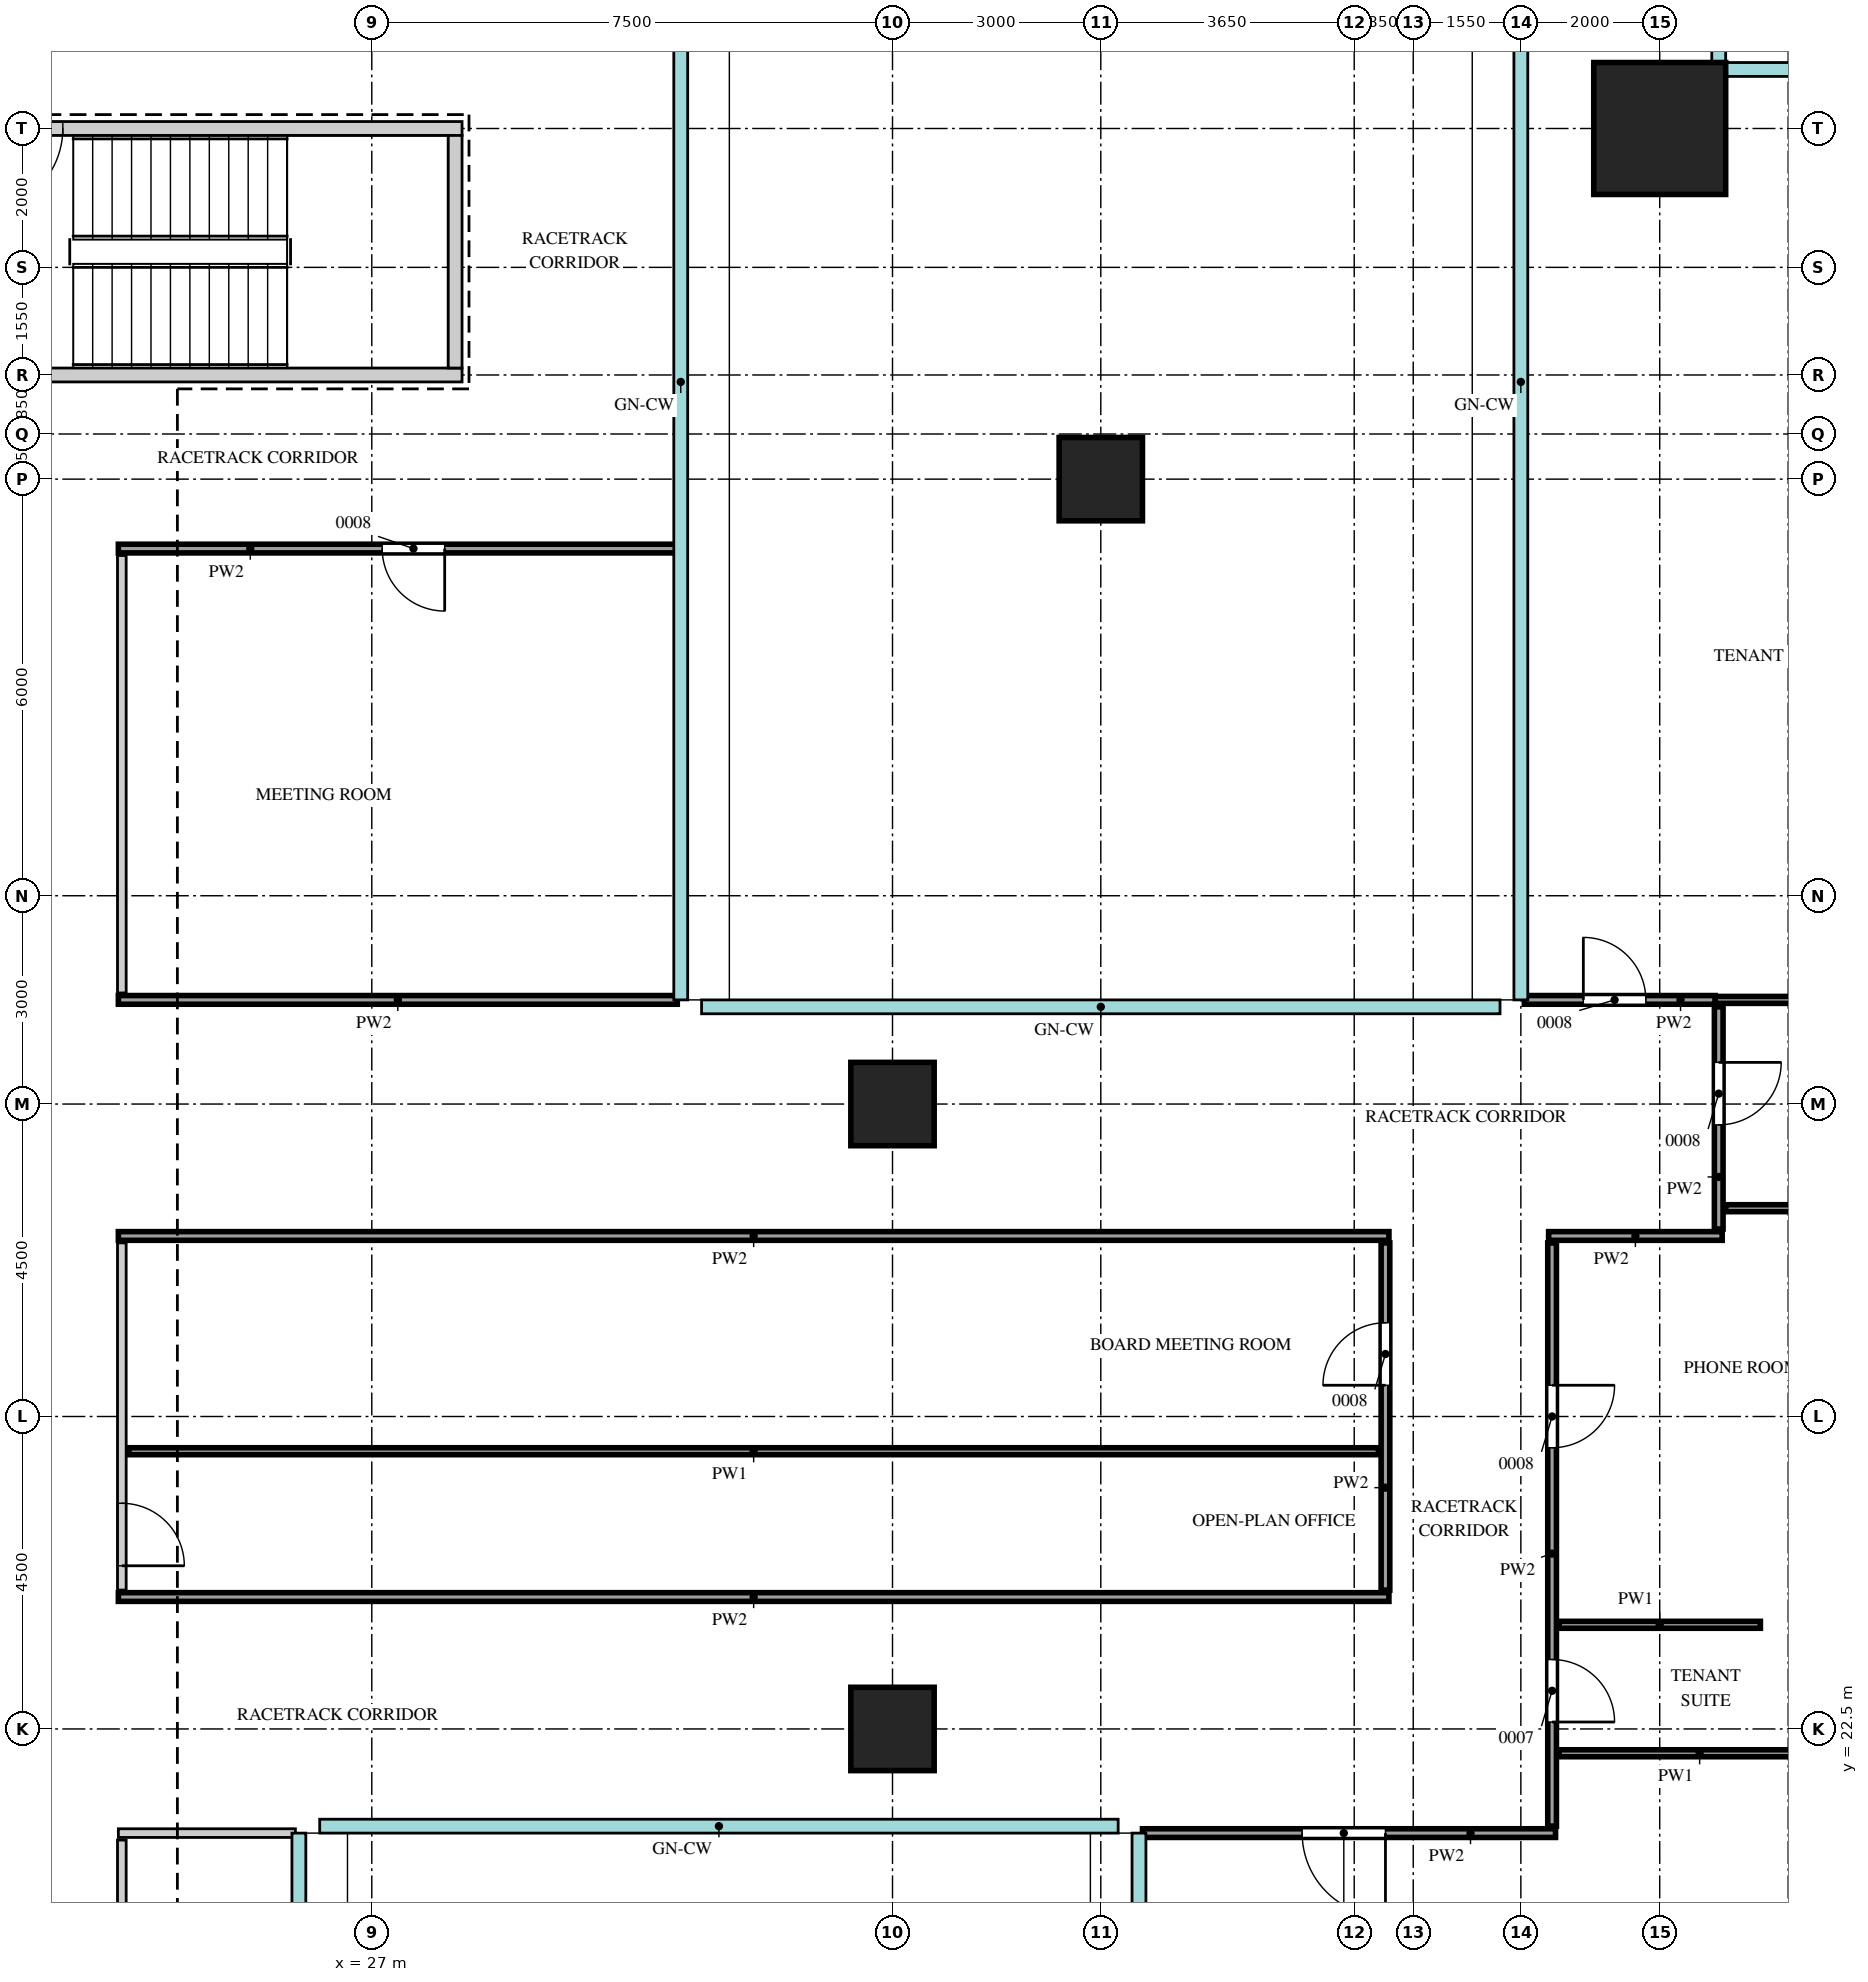
"""IFC4 building model, lengths in metres.
Left out: names, types, materials, properties, quantities, classifications, styles, units other than length and angle.
Written with IfcOpenShell. Run it as: python <this file> out.ifc"""

import sys

from ifc_helpers import new_model, si_unit, direction, frame, frame_2d, origin, origin_2d, place, context, subcontext, project, spatial, rectangle, extrude, source, transform, mapped, element, fill, save


model = new_model("IFC4")
c1 = context("Model", 3, precision=1e-05, world=origin(), true_north=direction((0.0, 1.0)))
c2 = subcontext(c1, "Body", "Model", "MODEL_VIEW")
j1 = project(units=[si_unit("LENGTHUNIT", "METRE"), si_unit("PLANEANGLEUNIT", "RADIAN")], contexts=[c1])
p1 = place(None, origin())
s1 = spatial("IfcSite", under=j1, at=p1, CompositionType="ELEMENT")
p2 = place(p1, origin())
s2 = spatial("IfcBuilding", under=s1, at=p2, CompositionType="ELEMENT")
p3 = place(p2, frame((0.0, 0.0, 168.7)))
s3 = spatial("IfcBuildingStorey", under=s2, at=p3, CompositionType="ELEMENT", Elevation=168.7)
m1 = source(origin(), c2, "Body", "SweptSolid", [
    extrude(rectangle(XDim=7.1, YDim=0.2, at=frame_2d((3.55, 0.0))), origin(), (0.0, 0.0, 1.0), 3.75),
])
p4 = place(p3, frame((21.2, 45.55, 0.0), z_axis=(0.0, 0.0, 1.0), x_axis=(1.0, 0.0, 0.0)))
e1 = element("IfcWall", 1, at=p4, inside=s3, PredefinedType="SHEAR", context=c2, shape_type="MappedRepresentation", body=[
    mapped(m1, transform((0.0, 0.0, 0.0))),
])
m2 = source(origin(), c2, "Body", "SweptSolid", [
    extrude(rectangle(XDim=1.2, YDim=2.1, at=frame_2d((0.6, 1.05))), frame((0.0, 0.11, 0.0), z_axis=(0.0, -1.0, 0.0), x_axis=(1.0, 0.0, 0.0)), (0.0, 0.0, 1.0), 0.22),
])
p5 = place(p4, frame((0.15, 0.0, 0.0)))
e2 = element("IfcOpeningElement", 2, at=p5, cuts=e1, PredefinedType="OPENING", context=c2, shape_type="MappedRepresentation", body=[
    mapped(m2, transform((0.0, 0.0, 0.0))),
])
p6 = place(p3, frame((21.2, 42.0, 0.0), z_axis=(0.0, 0.0, 1.0), x_axis=(1.0, 0.0, 0.0)))
e3 = element("IfcWall", 3, at=p6, inside=s3, PredefinedType="SHEAR", context=c2, shape_type="MappedRepresentation", body=[
    mapped(m1, transform((0.0, 0.0, 0.0))),
])
m3 = source(origin(), c2, "Body", "SweptSolid", [
    extrude(rectangle(XDim=3.35, YDim=0.2, at=frame_2d((1.675, 0.0))), origin(), (0.0, 0.0, 1.0), 3.75),
])
p7 = place(p3, frame((28.2, 42.1, 0.0), z_axis=(0.0, 0.0, 1.0), x_axis=(0.0, 1.0, 0.0)))
e4 = element("IfcWall", 4, at=p7, inside=s3, PredefinedType="SHEAR", context=c2, shape_type="MappedRepresentation", body=[
    mapped(m3, transform((0.0, 0.0, 0.0))),
])
m4 = source(origin(), c2, "Body", "SweptSolid", [
    extrude(rectangle(XDim=1.9, YDim=1.9, at=origin_2d()), origin(), (0.0, 0.0, 1.0), 4.0),
])
p8 = place(p3, frame((45.55, 45.55, 0.0), z_axis=(0.0, 0.0, 1.0), x_axis=(1.0, 0.0, 0.0)))
e5 = element("IfcColumn", 5, at=p8, inside=s3, PredefinedType="COLUMN", context=c2, shape_type="MappedRepresentation", body=[
    mapped(m4, transform((0.0, 0.0, 0.0))),
])
m5 = source(origin(), c2, "Body", "SweptSolid", [
    extrude(rectangle(XDim=1.2, YDim=1.2, at=origin_2d()), origin(), (0.0, 0.0, 1.0), 4.0),
])
p9 = place(p3, frame((37.5, 40.5, 0.0), z_axis=(0.0, 0.0, 1.0), x_axis=(1.0, 0.0, 0.0)))
e6 = element("IfcColumn", 6, at=p9, inside=s3, PredefinedType="COLUMN", context=c2, shape_type="MappedRepresentation", body=[
    mapped(m5, transform((0.0, 0.0, 0.0))),
])
m6 = source(origin(), c2, "Body", "SweptSolid", [
    extrude(rectangle(XDim=1.2, YDim=1.2, at=origin_2d()), origin(), (0.0, 0.0, 1.0), 3.75),
])
for number, where, z_axis, x_axis in (
    (7, (34.5, 22.5, 0.0), (0.0, 0.0, 1.0), (1.0, 0.0, 0.0)),
    (8, (34.5, 31.5, 0.0), (0.0, 0.0, 1.0), (1.0, 0.0, 0.0)),
):
    element("IfcColumn", number, at=place(p3, frame(where, z_axis=z_axis, x_axis=x_axis)), inside=s3, PredefinedType="COLUMN", context=c2, shape_type="MappedRepresentation", body=[
        mapped(m6, transform((0.0, 0.0, 0.0))),
    ])
m7 = source(origin(), c2, "Body", "SweptSolid", [
    extrude(rectangle(XDim=12.45, YDim=0.125, at=frame_2d((6.225, 0.0))), origin(), (0.0, 0.0, 1.0), 3.8),
])
p10 = place(p3, frame((23.4, 8.45, 0.0), z_axis=(0.0, 0.0, 1.0), x_axis=(0.0, 1.0, 0.0)))
e9 = element("IfcWall", 9, at=p10, inside=s3, PredefinedType="PARTITIONING", context=c2, shape_type="MappedRepresentation", body=[
    mapped(m7, transform((0.0, 0.0, 0.0))),
])
m8 = source(origin(), c2, "Body", "SweptSolid", [
    extrude(rectangle(XDim=0.9, YDim=2.1, at=frame_2d((0.45, 1.05))), frame((0.0, 0.073, 0.0), z_axis=(0.0, -1.0, 0.0), x_axis=(1.0, 0.0, 0.0)), (0.0, 0.0, 1.0), 0.145),
])
p11 = place(p10, frame((5.65, 0.0, 0.0)))
e10 = element("IfcOpeningElement", 10, at=p11, cuts=e9, PredefinedType="OPENING", context=c2, shape_type="MappedRepresentation", body=[
    mapped(m8, transform((0.0, 0.0, 0.0))),
])
m9 = source(origin(), c2, "Body", "SweptSolid", [
    extrude(rectangle(XDim=2.55, YDim=0.125, at=frame_2d((1.275, 0.0))), origin(), (0.0, 0.0, 1.0), 3.8),
])
p12 = place(p3, frame((23.35, 21.0, 0.0), z_axis=(0.0, 0.0, 1.0), x_axis=(1.0, 0.0, 0.0)))
e11 = element("IfcWall", 11, at=p12, inside=s3, PredefinedType="PARTITIONING", context=c2, shape_type="MappedRepresentation", body=[
    mapped(m9, transform((0.0, 0.0, 0.0))),
])
m10 = source(origin(), c2, "Body", "SweptSolid", [
    extrude(rectangle(XDim=5.95, YDim=0.125, at=frame_2d((2.975, 0.0))), origin(), (0.0, 0.0, 1.0), 3.8),
])
p13 = place(p3, frame((38.1, 21.0, 0.0), z_axis=(0.0, 0.0, 1.0), x_axis=(1.0, 0.0, 0.0)))
e12 = element("IfcWall", 12, at=p13, inside=s3, PredefinedType="PARTITIONING", context=c2, shape_type="MappedRepresentation", body=[
    mapped(m10, transform((0.0, 0.0, 0.0))),
])
m11 = source(origin(), c2, "Body", "SweptSolid", [
    extrude(rectangle(XDim=1.2, YDim=2.1, at=frame_2d((0.6, 1.05))), frame((0.0, 0.073, 0.0), z_axis=(0.0, -1.0, 0.0), x_axis=(1.0, 0.0, 0.0)), (0.0, 0.0, 1.0), 0.145),
])
p14 = place(p13, frame((2.3, 0.0, 0.0)))
e13 = element("IfcOpeningElement", 13, at=p14, cuts=e12, PredefinedType="OPENING", context=c2, shape_type="MappedRepresentation", body=[
    mapped(m11, transform((0.0, 0.0, 0.0))),
])
m12 = source(origin(), c2, "Body", "SweptSolid", [
    extrude(rectangle(XDim=8.4, YDim=0.125, at=frame_2d((4.2, 0.0))), origin(), (0.0, 0.0, 1.0), 3.8),
])
p15 = place(p3, frame((44.0, 21.1, 0.0), z_axis=(0.0, 0.0, 1.0), x_axis=(0.0, 1.0, 0.0)))
e14 = element("IfcWall", 14, at=p15, inside=s3, PredefinedType="PARTITIONING", context=c2, shape_type="MappedRepresentation", body=[
    mapped(m12, transform((0.0, 0.0, 0.0))),
])
p16 = place(p15, frame((1.5, 0.0, 0.0)))
e15 = element("IfcOpeningElement", 15, at=p16, cuts=e14, PredefinedType="OPENING", context=c2, shape_type="MappedRepresentation", body=[
    mapped(m8, transform((0.0, 0.0, 0.0))),
])
p17 = place(p15, frame((5.45, 0.0, 0.0)))
e16 = element("IfcOpeningElement", 16, at=p17, cuts=e14, PredefinedType="OPENING", context=c2, shape_type="MappedRepresentation", body=[
    mapped(m8, transform((0.0, 0.0, 0.0))),
])
m13 = source(origin(), c2, "Body", "SweptSolid", [
    extrude(rectangle(XDim=4.05, YDim=0.1, at=frame_2d((2.025, 0.0))), origin(), (0.0, 0.0, 1.0), 3.8),
])
p18 = place(p3, frame((44.1, 22.15, 0.0), z_axis=(0.0, 0.0, 1.0), x_axis=(1.0, 0.0, 0.0)))
e17 = element("IfcWall", 17, at=p18, inside=s3, PredefinedType="PARTITIONING", context=c2, shape_type="MappedRepresentation", body=[
    mapped(m13, transform((0.0, 0.0, 0.0))),
])
m14 = source(origin(), c2, "Body", "SweptSolid", [
    extrude(rectangle(XDim=2.9, YDim=0.1, at=frame_2d((1.45, 0.0))), origin(), (0.0, 0.0, 1.0), 3.8),
])
p19 = place(p3, frame((44.1, 24.0, 0.0), z_axis=(0.0, 0.0, 1.0), x_axis=(1.0, 0.0, 0.0)))
e18 = element("IfcWall", 18, at=p19, inside=s3, PredefinedType="PARTITIONING", context=c2, shape_type="MappedRepresentation", body=[
    mapped(m14, transform((0.0, 0.0, 0.0))),
])
m15 = source(origin(), c2, "Body", "SweptSolid", [
    extrude(rectangle(XDim=18.3, YDim=0.125, at=frame_2d((9.15, 0.0))), origin(), (0.0, 0.0, 1.0), 3.8),
])
p20 = place(p3, frame((23.35, 24.4, 0.0), z_axis=(0.0, 0.0, 1.0), x_axis=(1.0, 0.0, 0.0)))
e19 = element("IfcWall", 19, at=p20, inside=s3, PredefinedType="PARTITIONING", context=c2, shape_type="MappedRepresentation", body=[
    mapped(m15, transform((0.0, 0.0, 0.0))),
])
m16 = source(origin(), c2, "Body", "SweptSolid", [
    extrude(rectangle(XDim=5.0, YDim=0.125, at=frame_2d((2.5, 0.0))), origin(), (0.0, 0.0, 1.0), 3.8),
])
p21 = place(p3, frame((23.4, 24.5, 0.0), z_axis=(0.0, 0.0, 1.0), x_axis=(0.0, 1.0, 0.0)))
e20 = element("IfcWall", 20, at=p21, inside=s3, PredefinedType="PARTITIONING", context=c2, shape_type="MappedRepresentation", body=[
    mapped(m16, transform((0.0, 0.0, 0.0))),
])
p22 = place(p21, frame((0.35, 0.0, 0.0)))
e21 = element("IfcOpeningElement", 21, at=p22, cuts=e20, PredefinedType="OPENING", context=c2, shape_type="MappedRepresentation", body=[
    mapped(m8, transform((0.0, 0.0, 0.0))),
])
p23 = place(p3, frame((41.6, 24.5, 0.0), z_axis=(0.0, 0.0, 1.0), x_axis=(0.0, 1.0, 0.0)))
e22 = element("IfcWall", 22, at=p23, inside=s3, PredefinedType="PARTITIONING", context=c2, shape_type="MappedRepresentation", body=[
    mapped(m16, transform((0.0, 0.0, 0.0))),
])
p24 = place(p23, frame((2.95, 0.0, 0.0)))
e23 = element("IfcOpeningElement", 23, at=p24, cuts=e22, PredefinedType="OPENING", context=c2, shape_type="MappedRepresentation", body=[
    mapped(m8, transform((0.0, 0.0, 0.0))),
])
m17 = source(origin(), c2, "Body", "SweptSolid", [
    extrude(rectangle(XDim=18.0, YDim=0.1, at=frame_2d((9.0, 0.0))), origin(), (0.0, 0.0, 1.0), 3.8),
])
p25 = place(p3, frame((23.5, 26.5, 0.0), z_axis=(0.0, 0.0, 1.0), x_axis=(1.0, 0.0, 0.0)))
e24 = element("IfcWall", 24, at=p25, inside=s3, PredefinedType="PARTITIONING", context=c2, shape_type="MappedRepresentation", body=[
    mapped(m17, transform((0.0, 0.0, 0.0))),
])
p26 = place(p3, frame((23.35, 29.6, 0.0), z_axis=(0.0, 0.0, 1.0), x_axis=(1.0, 0.0, 0.0)))
e25 = element("IfcWall", 25, at=p26, inside=s3, PredefinedType="PARTITIONING", context=c2, shape_type="MappedRepresentation", body=[
    mapped(m15, transform((0.0, 0.0, 0.0))),
])
m18 = source(origin(), c2, "Body", "SweptSolid", [
    extrude(rectangle(XDim=2.5, YDim=0.125, at=frame_2d((1.25, 0.0))), origin(), (0.0, 0.0, 1.0), 3.8),
])
p27 = place(p3, frame((43.95, 29.6, 0.0), z_axis=(0.0, 0.0, 1.0), x_axis=(1.0, 0.0, 0.0)))
e26 = element("IfcWall", 26, at=p27, inside=s3, PredefinedType="PARTITIONING", context=c2, shape_type="MappedRepresentation", body=[
    mapped(m18, transform((0.0, 0.0, 0.0))),
])
m19 = source(origin(), c2, "Body", "SweptSolid", [
    extrude(rectangle(XDim=3.2, YDim=0.125, at=frame_2d((1.6, 0.0))), origin(), (0.0, 0.0, 1.0), 3.8),
])
p28 = place(p3, frame((46.4, 29.7, 0.0), z_axis=(0.0, 0.0, 1.0), x_axis=(0.0, 1.0, 0.0)))
e27 = element("IfcWall", 27, at=p28, inside=s3, PredefinedType="PARTITIONING", context=c2, shape_type="MappedRepresentation", body=[
    mapped(m19, transform((0.0, 0.0, 0.0))),
])
p29 = place(p28, frame((1.5, 0.0, 0.0)))
e28 = element("IfcOpeningElement", 28, at=p29, cuts=e27, PredefinedType="OPENING", context=c2, shape_type="MappedRepresentation", body=[
    mapped(m8, transform((0.0, 0.0, 0.0))),
])
m20 = source(origin(), c2, "Body", "SweptSolid", [
    extrude(rectangle(XDim=4.35, YDim=0.1, at=frame_2d((2.175, 0.0))), origin(), (0.0, 0.0, 1.0), 3.8),
])
p30 = place(p3, frame((46.5, 30.0, 0.0), z_axis=(0.0, 0.0, 1.0), x_axis=(1.0, 0.0, 0.0)))
e29 = element("IfcWall", 29, at=p30, inside=s3, PredefinedType="PARTITIONING", context=c2, shape_type="MappedRepresentation", body=[
    mapped(m20, transform((0.0, 0.0, 0.0))),
])
m21 = source(origin(), c2, "Body", "SweptSolid", [
    extrude(rectangle(XDim=8.05, YDim=0.125, at=frame_2d((4.025, 0.0))), origin(), (0.0, 0.0, 1.0), 3.8),
])
p31 = place(p3, frame((23.35, 33.0, 0.0), z_axis=(0.0, 0.0, 1.0), x_axis=(1.0, 0.0, 0.0)))
e30 = element("IfcWall", 30, at=p31, inside=s3, PredefinedType="PARTITIONING", context=c2, shape_type="MappedRepresentation", body=[
    mapped(m21, transform((0.0, 0.0, 0.0))),
])
m22 = source(origin(), c2, "Body", "SweptSolid", [
    extrude(rectangle(XDim=2.75, YDim=0.125, at=frame_2d((1.375, 0.0))), origin(), (0.0, 0.0, 1.0), 3.8),
])
p32 = place(p3, frame((43.6, 33.0, 0.0), z_axis=(0.0, 0.0, 1.0), x_axis=(1.0, 0.0, 0.0)))
e31 = element("IfcWall", 31, at=p32, inside=s3, PredefinedType="PARTITIONING", context=c2, shape_type="MappedRepresentation", body=[
    mapped(m22, transform((0.0, 0.0, 0.0))),
])
p33 = place(p32, frame((0.85, 0.0, 0.0)))
e32 = element("IfcOpeningElement", 32, at=p33, cuts=e31, PredefinedType="OPENING", context=c2, shape_type="MappedRepresentation", body=[
    mapped(m8, transform((0.0, 0.0, 0.0))),
])
m23 = source(origin(), c2, "Body", "SweptSolid", [
    extrude(rectangle(XDim=4.5, YDim=0.1, at=frame_2d((2.25, 0.0))), origin(), (0.0, 0.0, 1.0), 3.8),
])
p34 = place(p3, frame((46.35, 33.0, 0.0), z_axis=(0.0, 0.0, 1.0), x_axis=(1.0, 0.0, 0.0)))
e33 = element("IfcWall", 33, at=p34, inside=s3, PredefinedType="PARTITIONING", context=c2, shape_type="MappedRepresentation", body=[
    mapped(m23, transform((0.0, 0.0, 0.0))),
])
m24 = source(origin(), c2, "Body", "SweptSolid", [
    extrude(rectangle(XDim=6.3, YDim=0.125, at=frame_2d((3.15, 0.0))), origin(), (0.0, 0.0, 1.0), 3.8),
])
p35 = place(p3, frame((23.4, 33.1, 0.0), z_axis=(0.0, 0.0, 1.0), x_axis=(0.0, 1.0, 0.0)))
e34 = element("IfcWall", 34, at=p35, inside=s3, PredefinedType="PARTITIONING", context=c2, shape_type="MappedRepresentation", body=[
    mapped(m24, transform((0.0, 0.0, 0.0))),
])
p36 = place(p3, frame((23.35, 39.5, 0.0), z_axis=(0.0, 0.0, 1.0), x_axis=(1.0, 0.0, 0.0)))
e35 = element("IfcWall", 35, at=p36, inside=s3, PredefinedType="PARTITIONING", context=c2, shape_type="MappedRepresentation", body=[
    mapped(m21, transform((0.0, 0.0, 0.0))),
])
p37 = place(p36, frame((3.8, 0.0, 0.0)))
e36 = element("IfcOpeningElement", 36, at=p37, cuts=e35, PredefinedType="OPENING", context=c2, shape_type="MappedRepresentation", body=[
    mapped(m8, transform((0.0, 0.0, 0.0))),
])
m25 = source(origin(), c2, "Body", "SweptSolid", [
    extrude(rectangle(XDim=1.2, YDim=2.1, at=frame_2d((0.6, 1.05))), frame((0.0, 0.025, 0.0), z_axis=(0.0, -1.0, 0.0), x_axis=(1.0, 0.0, 0.0)), (0.0, 0.0, 1.0), 0.05),
])
p38 = place(p14, origin())
e37 = element("IfcDoor", 37, at=p38, inside=s3, OperationType="SINGLE_SWING_RIGHT", PredefinedType="DOOR", context=c2, shape_type="MappedRepresentation", body=[
    mapped(m25, transform((0.0, 0.0, 0.0))),
])
fill(e13, e37)
m26 = source(origin(), c2, "Body", "SweptSolid", [
    extrude(rectangle(XDim=0.9, YDim=2.1, at=frame_2d((0.45, 1.05))), frame((0.0, 0.025, 0.0), z_axis=(0.0, -1.0, 0.0), x_axis=(1.0, 0.0, 0.0)), (0.0, 0.0, 1.0), 0.05),
])
p39 = place(p33, origin())
e38 = element("IfcDoor", 38, at=p39, inside=s3, OperationType="SINGLE_SWING_RIGHT", PredefinedType="DOOR", context=c2, shape_type="MappedRepresentation", body=[
    mapped(m26, transform((0.0, 0.0, 0.0))),
])
fill(e32, e38)
p40 = place(p37, origin())
e39 = element("IfcDoor", 39, at=p40, inside=s3, OperationType="SINGLE_SWING_RIGHT", PredefinedType="DOOR", context=c2, shape_type="MappedRepresentation", body=[
    mapped(m26, transform((0.0, 0.0, 0.0))),
])
fill(e36, e39)
p41 = place(p16, origin())
e40 = element("IfcDoor", 40, at=p41, inside=s3, OperationType="SINGLE_SWING_LEFT", PredefinedType="DOOR", context=c2, shape_type="MappedRepresentation", body=[
    mapped(m26, transform((0.0, 0.0, 0.0))),
])
fill(e15, e40)
p42 = place(p17, origin())
e41 = element("IfcDoor", 41, at=p42, inside=s3, OperationType="SINGLE_SWING_RIGHT", PredefinedType="DOOR", context=c2, shape_type="MappedRepresentation", body=[
    mapped(m26, transform((0.0, 0.0, 0.0))),
])
fill(e16, e41)
p43 = place(p29, origin())
e42 = element("IfcDoor", 42, at=p43, inside=s3, OperationType="SINGLE_SWING_RIGHT", PredefinedType="DOOR", context=c2, shape_type="MappedRepresentation", body=[
    mapped(m26, transform((0.0, 0.0, 0.0))),
])
fill(e28, e42)
p44 = place(p22, origin())
e43 = element("IfcDoor", 43, at=p44, inside=s3, OperationType="SINGLE_SWING_LEFT", PredefinedType="DOOR", context=c2, shape_type="MappedRepresentation", body=[
    mapped(m26, transform((0.0, 0.0, 0.0))),
])
fill(e21, e43)
p45 = place(p24, origin())
e44 = element("IfcDoor", 44, at=p45, inside=s3, OperationType="SINGLE_SWING_RIGHT", PredefinedType="DOOR", context=c2, shape_type="MappedRepresentation", body=[
    mapped(m26, transform((0.0, 0.0, 0.0))),
])
fill(e23, e44)
p46 = place(p5, origin())
e45 = element("IfcDoor", 45, at=p46, inside=s3, OperationType="SINGLE_SWING_LEFT", PredefinedType="DOOR", context=c2, shape_type="MappedRepresentation", body=[
    mapped(m25, transform((0.0, 0.0, 0.0))),
])
fill(e2, e45)
save(model, sys.argv[1])
